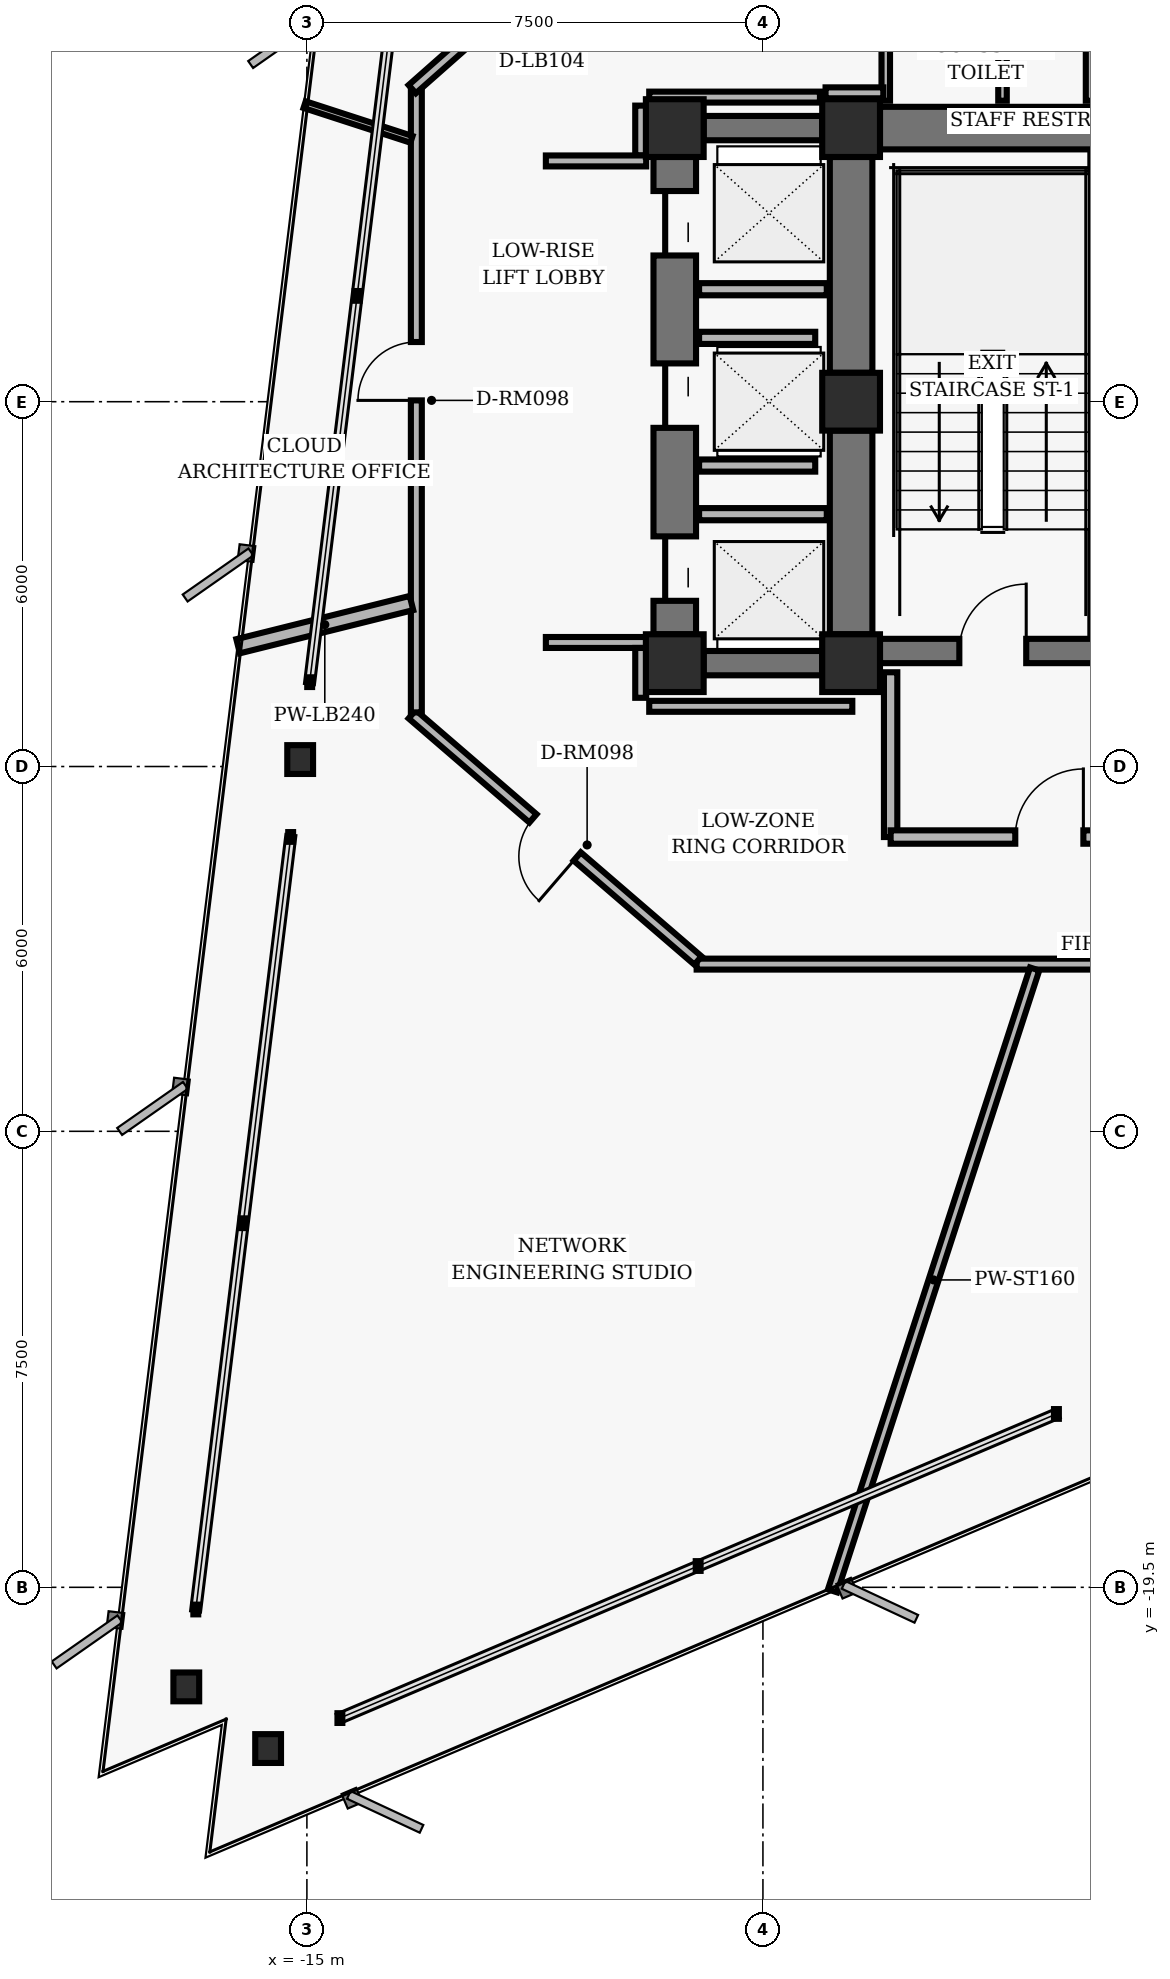
"""IFC4 building model, lengths in metres.
Left out: names, types, materials, properties, quantities, classifications, styles, units other than length and angle.
Written with IfcOpenShell. Run it as: python <this file> out.ifc"""

import sys

from ifc_helpers import new_model, si_unit, direction, frame, frame_2d, origin, origin_2d, place, context, subcontext, project, spatial, rectangle, hollow_rectangle, i_section, extrude, element, fill, save


model = new_model("IFC4")
c1 = context("Model", 3, precision=1e-05, world=origin(), true_north=direction((0.0, 1.0)))
c2 = subcontext(c1, "Body", "Model", "MODEL_VIEW")
j1 = project(units=[si_unit("LENGTHUNIT", "METRE"), si_unit("PLANEANGLEUNIT", "RADIAN")], contexts=[c1])
p1 = place(None, origin())
s1 = spatial("IfcSite", under=j1, at=p1, CompositionType="ELEMENT")
p2 = place(p1, origin())
s2 = spatial("IfcBuilding", under=s1, at=p2, CompositionType="ELEMENT")
p3 = place(p2, frame((0.0, 0.0, 56.32)))
s3 = spatial("IfcBuildingStorey", under=s2, at=p3, CompositionType="ELEMENT", Elevation=56.32)
for number, where, z_axis, x_axis in (
    (1, (-6.05, 4.5, 0.0), (0.0, 0.0, 1.0), (1.0, 0.0, 0.0)),
    (2, (-6.05, 0.0, 0.0), (0.0, 0.0, 1.0), (1.0, 0.0, 0.0)),
    (3, (-6.05, -4.3, 0.0), (0.0, 0.0, 1.0), (1.0, 0.0, 0.0)),
    (4, (-8.95, 4.5, 0.0), (0.0, 0.0, 1.0), (1.0, 0.0, 0.0)),
    (5, (-8.95, -4.3, 0.0), (0.0, 0.0, 1.0), (1.0, 0.0, 0.0)),
):
    element("IfcColumn", number, at=place(p3, frame(where, z_axis=z_axis, x_axis=x_axis)), inside=s3, PredefinedType="COLUMN", context=c2, shape_type="SweptSolid", body=[
        extrude(hollow_rectangle(XDim=0.95, YDim=0.95, WallThickness=0.06, InnerFilletRadius=0.02, OuterFilletRadius=0.04, at=origin_2d()), origin(), (0.0, 0.0, 1.0), 3.36),
    ])
p4 = place(p3, frame((-6.05, 0.475, 0.0), z_axis=(0.0, 0.0, 1.0), x_axis=(0.0, 1.0, 0.0)))
e6 = element("IfcWall", 6, at=p4, inside=s3, PredefinedType="SHEAR", context=c2, shape_type="SweptSolid", body=[
    extrude(rectangle(XDim=3.55, YDim=0.7, at=frame_2d((1.775, 0.0))), origin(), (0.0, 0.0, 1.0), 3.098),
])
p5 = place(p3, frame((-6.05, -3.825, 0.0), z_axis=(0.0, 0.0, 1.0), x_axis=(0.0, 1.0, 0.0)))
e7 = element("IfcWall", 7, at=p5, inside=s3, PredefinedType="SHEAR", context=c2, shape_type="SweptSolid", body=[
    extrude(rectangle(XDim=3.35, YDim=0.7, at=frame_2d((1.675, 0.0))), origin(), (0.0, 0.0, 1.0), 3.098),
])
p6 = place(p3, frame((-5.575, -4.1, 0.0), z_axis=(0.0, 0.0, 1.0), x_axis=(1.0, 0.0, 0.0)))
e8 = element("IfcWall", 8, at=p6, inside=s3, PredefinedType="SHEAR", context=c2, shape_type="SweptSolid", body=[
    extrude(rectangle(XDim=11.15, YDim=0.4, at=frame_2d((5.575, 0.0))), origin(), (0.0, 0.0, 1.0), 3.098),
])
p7 = place(p6, frame((1.305, 0.0, 0.0)))
e9 = element("IfcOpeningElement", 9, at=p7, cuts=e8, PredefinedType="OPENING", context=c2, shape_type="SweptSolid", body=[
    extrude(rectangle(XDim=1.1, YDim=2.04, at=frame_2d((0.55, 1.02))), frame((0.0, 0.21, 0.0), z_axis=(0.0, -1.0, 0.0), x_axis=(1.0, 0.0, 0.0)), (0.0, 0.0, 1.0), 0.42),
])
p8 = place(p6, frame((8.745, 0.0, 0.0)))
e10 = element("IfcOpeningElement", 10, at=p8, cuts=e8, PredefinedType="OPENING", context=c2, shape_type="SweptSolid", body=[
    extrude(rectangle(XDim=1.1, YDim=2.04, at=frame_2d((0.55, 1.02))), frame((0.0, 0.21, 0.0), z_axis=(0.0, -1.0, 0.0), x_axis=(1.0, 0.0, 0.0)), (0.0, 0.0, 1.0), 0.42),
])
p9 = place(p6, frame((4.045, 0.0, 0.0)))
e11 = element("IfcOpeningElement", 11, at=p9, cuts=e8, PredefinedType="OPENING", context=c2, shape_type="SweptSolid", body=[
    extrude(rectangle(XDim=1.06, YDim=2.04, at=frame_2d((0.53, 1.02))), frame((0.0, 0.21, 0.0), z_axis=(0.0, -1.0, 0.0), x_axis=(1.0, 0.0, 0.0)), (0.0, 0.0, 1.0), 0.42),
])
p10 = place(p6, frame((6.045, 0.0, 0.0)))
e12 = element("IfcOpeningElement", 12, at=p10, cuts=e8, PredefinedType="OPENING", context=c2, shape_type="SweptSolid", body=[
    extrude(rectangle(XDim=1.06, YDim=2.04, at=frame_2d((0.53, 1.02))), frame((0.0, 0.21, 0.0), z_axis=(0.0, -1.0, 0.0), x_axis=(1.0, 0.0, 0.0)), (0.0, 0.0, 1.0), 0.42),
])
p11 = place(p3, frame((-5.575, 4.5, 0.0), z_axis=(0.0, 0.0, 1.0), x_axis=(1.0, 0.0, 0.0)))
e13 = element("IfcWall", 13, at=p11, inside=s3, PredefinedType="SHEAR", context=c2, shape_type="SweptSolid", body=[
    extrude(rectangle(XDim=3.525, YDim=0.7, at=frame_2d((1.762, 0.0))), origin(), (0.0, 0.0, 1.0), 3.098),
])
p12 = place(p3, frame((-8.95, -3.825, 0.0), z_axis=(0.0, 0.0, 1.0), x_axis=(0.0, 1.0, 0.0)))
e14 = element("IfcWall", 14, at=p12, inside=s3, PredefinedType="SHEAR", context=c2, shape_type="SweptSolid", body=[
    extrude(rectangle(XDim=7.85, YDim=0.7, at=frame_2d((3.925, 0.0))), origin(), (0.0, 0.0, 1.0), 3.098),
])
p13 = place(p12, frame((0.55, 0.0, 0.0)))
e15 = element("IfcOpeningElement", 15, at=p13, cuts=e14, PredefinedType="OPENING", context=c2, shape_type="SweptSolid", body=[
    extrude(rectangle(XDim=1.06, YDim=2.04, at=frame_2d((0.53, 1.02))), frame((0.0, 0.36, 0.0), z_axis=(0.0, -1.0, 0.0), x_axis=(1.0, 0.0, 0.0)), (0.0, 0.0, 1.0), 0.72),
])
p14 = place(p12, frame((3.395, 0.0, 0.0)))
e16 = element("IfcOpeningElement", 16, at=p14, cuts=e14, PredefinedType="OPENING", context=c2, shape_type="SweptSolid", body=[
    extrude(rectangle(XDim=1.06, YDim=2.04, at=frame_2d((0.53, 1.02))), frame((0.0, 0.36, 0.0), z_axis=(0.0, -1.0, 0.0), x_axis=(1.0, 0.0, 0.0)), (0.0, 0.0, 1.0), 0.72),
])
p15 = place(p12, frame((6.23, 0.0, 0.0)))
e17 = element("IfcOpeningElement", 17, at=p15, cuts=e14, PredefinedType="OPENING", context=c2, shape_type="SweptSolid", body=[
    extrude(rectangle(XDim=1.06, YDim=2.04, at=frame_2d((0.53, 1.02))), frame((0.0, 0.36, 0.0), z_axis=(0.0, -1.0, 0.0), x_axis=(1.0, 0.0, 0.0)), (0.0, 0.0, 1.0), 0.72),
])
for number, where, z_axis, x_axis in (
    (18, (-8.475, 4.5, 0.0), (0.0, 0.0, 1.0), (1.0, 0.0, 0.0)),
    (19, (-8.475, -4.3, 0.0), (0.0, 0.0, 1.0), (1.0, 0.0, 0.0)),
):
    element("IfcWall", number, at=place(p3, frame(where, z_axis=z_axis, x_axis=x_axis)), inside=s3, PredefinedType="SHEAR", context=c2, shape_type="SweptSolid", body=[
        extrude(rectangle(XDim=1.95, YDim=0.4, at=frame_2d((0.975, 0.0))), origin(), (0.0, 0.0, 1.0), 3.098),
    ])
for number, where, z_axis, x_axis in (
    (20, (-15.111, -5.886, 0.0), (0.0, 0.0, 1.0), (1.0, 0.0, 0.0)),
    (21, (-16.983, -21.138, 0.0), (0.0, 0.0, 1.0), (1.0, 0.0, 0.0)),
    (22, (-15.638, -22.152, 0.0), (0.0, 0.0, 1.0), (1.0, 0.0, 0.0)),
):
    element("IfcColumn", number, at=place(p3, frame(where, z_axis=z_axis, x_axis=x_axis)), inside=s3, PredefinedType="COLUMN", context=c2, shape_type="SweptSolid", body=[
        extrude(i_section(OverallWidth=0.424, OverallDepth=0.474, WebThickness=0.048, FlangeThickness=0.077, FilletRadius=0.025, at=origin_2d()), origin(), (0.0, 0.0, 1.0), 3.36),
    ])
p16 = place(p3, frame((-5.4, -7.16, 0.0), z_axis=(0.0, 0.0, 1.0), x_axis=(0.0, 1.0, 0.0)))
e23 = element("IfcWall", 23, at=p16, inside=s3, PredefinedType="PARTITIONING", context=c2, shape_type="SweptSolid", body=[
    extrude(rectangle(XDim=2.71, YDim=0.22, at=frame_2d((1.355, 0.0))), origin(), (0.0, 0.0, 1.0), 3.073),
])
p17 = place(p3, frame((-5.4, -7.16, 0.0), z_axis=(0.0, 0.0, 1.0), x_axis=(1.0, 0.0, 0.0)))
e24 = element("IfcWall", 24, at=p17, inside=s3, PredefinedType="PARTITIONING", context=c2, shape_type="SweptSolid", body=[
    extrude(rectangle(XDim=5.4, YDim=0.22, at=frame_2d((2.7, 0.0))), origin(), (0.0, 0.0, 1.0), 2.587),
])
p18 = place(p17, frame((2.05, 0.0, 0.0)))
e25 = element("IfcOpeningElement", 25, at=p18, cuts=e24, PredefinedType="OPENING", context=c2, shape_type="SweptSolid", body=[
    extrude(rectangle(XDim=1.12, YDim=2.02, at=frame_2d((0.56, 1.01))), frame((0.0, 0.12, 0.0), z_axis=(0.0, -1.0, 0.0), x_axis=(1.0, 0.0, 0.0)), (0.0, 0.0, 1.0), 0.24),
])
for number, where, z_axis, x_axis in (
    (26, (-5.48, 4.95, 0.0), (0.0, 0.0, 1.0), (0.0, 1.0, 0.0)),
    (27, (-3.56, 4.95, 0.0), (0.0, 0.0, 1.0), (0.0, 1.0, 0.0)),
    (28, (-2.12, 4.95, 0.0), (0.0, 0.0, 1.0), (0.0, 1.0, 0.0)),
):
    element("IfcWall", number, at=place(p3, frame(where, z_axis=z_axis, x_axis=x_axis)), inside=s3, PredefinedType="PARTITIONING", context=c2, shape_type="SweptSolid", body=[
        extrude(rectangle(XDim=2.1, YDim=0.14, at=frame_2d((1.05, 0.0))), origin(), (0.0, 0.0, 1.0), 3.073),
    ])
for number, where, z_axis, x_axis in (
    (29, (-8.55, -1.85, 0.0), (0.0, 0.0, 1.0), (1.0, 0.0, 0.0)),
    (30, (-8.55, 1.85, 0.0), (0.0, 0.0, 1.0), (1.0, 0.0, 0.0)),
):
    element("IfcWall", number, at=place(p3, frame(where, z_axis=z_axis, x_axis=x_axis)), inside=s3, PredefinedType="PARTITIONING", context=c2, shape_type="SweptSolid", body=[
        extrude(rectangle(XDim=2.1, YDim=0.2, at=frame_2d((1.05, 0.0))), origin(), (0.0, 0.0, 1.0), 3.073),
    ])
for number, where, z_axis, x_axis in (
    (31, (-8.55, -1.05, 0.0), (0.0, 0.0, 1.0), (1.0, 0.0, 0.0)),
    (32, (-8.55, 1.05, 0.0), (0.0, 0.0, 1.0), (1.0, 0.0, 0.0)),
):
    element("IfcWall", number, at=place(p3, frame(where, z_axis=z_axis, x_axis=x_axis)), inside=s3, PredefinedType="PARTITIONING", context=c2, shape_type="SweptSolid", body=[
        extrude(rectangle(XDim=1.91, YDim=0.2, at=frame_2d((0.955, 0.0))), origin(), (0.0, 0.0, 1.0), 3.073),
    ])
p19 = place(p3, frame((8.41, -9.25, 0.0), z_axis=(0.0, 0.0, 1.0), x_axis=(-1.0, 0.0, 0.0)))
e33 = element("IfcWall", 33, at=p19, inside=s3, PredefinedType="PARTITIONING", context=c2, shape_type="SweptSolid", body=[
    extrude(rectangle(XDim=17.0, YDim=0.18, at=frame_2d((8.5, 0.0))), origin(), (0.0, 0.0, 1.0), 2.587),
])
p20 = place(p19, frame((5.34, 0.0, 0.0)))
e34 = element("IfcOpeningElement", 34, at=p20, cuts=e33, PredefinedType="OPENING", context=c2, shape_type="SweptSolid", body=[
    extrude(rectangle(XDim=1.02, YDim=2.02, at=frame_2d((0.51, 1.01))), frame((0.0, 0.1, 0.0), z_axis=(0.0, -1.0, 0.0), x_axis=(1.0, 0.0, 0.0)), (0.0, 0.0, 1.0), 0.2),
])
p21 = place(p3, frame((-8.568, -9.191, 0.0), z_axis=(0.0, 0.0, 1.0), x_axis=(-0.757556899173, 0.652769135694, 0.0)))
e35 = element("IfcWall", 35, at=p21, inside=s3, PredefinedType="PARTITIONING", context=c2, shape_type="SweptSolid", body=[
    extrude(rectangle(XDim=6.204, YDim=0.18, at=frame_2d((3.102, 0.0))), origin(), (0.0, 0.0, 1.0), 3.073),
])
p22 = place(p21, frame((2.622, 0.0, 0.0)))
e36 = element("IfcOpeningElement", 36, at=p22, cuts=e35, PredefinedType="OPENING", context=c2, shape_type="SweptSolid", body=[
    extrude(rectangle(XDim=0.96, YDim=2.02, at=frame_2d((0.48, 1.01))), frame((0.0, 0.1, 0.0), z_axis=(0.0, -1.0, 0.0), x_axis=(1.0, 0.0, 0.0)), (0.0, 0.0, 1.0), 0.2),
])
p23 = place(p3, frame((-13.2, -5.11, 0.0), z_axis=(0.0, 0.0, 1.0), x_axis=(0.0, 1.0, 0.0)))
e37 = element("IfcWall", 37, at=p23, inside=s3, PredefinedType="PARTITIONING", context=c2, shape_type="SweptSolid", body=[
    extrude(rectangle(XDim=10.22, YDim=0.18, at=frame_2d((5.11, 0.0))), origin(), (0.0, 0.0, 1.0), 2.587),
])
p24 = place(p23, frame((5.132, 0.0, 0.0)))
e38 = element("IfcOpeningElement", 38, at=p24, cuts=e37, PredefinedType="OPENING", context=c2, shape_type="SweptSolid", body=[
    extrude(rectangle(XDim=0.96, YDim=2.02, at=frame_2d((0.48, 1.01))), frame((0.0, 0.1, 0.0), z_axis=(0.0, -1.0, 0.0), x_axis=(1.0, 0.0, 0.0)), (0.0, 0.0, 1.0), 0.2),
])
p25 = place(p3, frame((-13.268, 5.14, 0.0), z_axis=(0.0, 0.0, 1.0), x_axis=(0.749626463267, 0.66186113768, 0.0)))
e39 = element("IfcWall", 39, at=p25, inside=s3, PredefinedType="PARTITIONING", context=c2, shape_type="SweptSolid", body=[
    extrude(rectangle(XDim=6.27, YDim=0.18, at=frame_2d((3.135, 0.0))), origin(), (0.0, 0.0, 1.0), 3.073),
])
p26 = place(p25, frame((2.625, 0.0, 0.0)))
e40 = element("IfcOpeningElement", 40, at=p26, cuts=e39, PredefinedType="OPENING", context=c2, shape_type="SweptSolid", body=[
    extrude(rectangle(XDim=1.02, YDim=2.02, at=frame_2d((0.51, 1.01))), frame((0.0, 0.1, 0.0), z_axis=(0.0, -1.0, 0.0), x_axis=(1.0, 0.0, 0.0)), (0.0, 0.0, 1.0), 0.2),
])
p27 = place(p3, frame((-9.51, 4.87, 0.0), z_axis=(0.0, 0.0, 1.0), x_axis=(0.0, -1.0, 0.0)))
e41 = element("IfcWall", 41, at=p27, inside=s3, PredefinedType="PARTITIONING", context=c2, shape_type="SweptSolid", body=[
    extrude(rectangle(XDim=0.82, YDim=0.18, at=frame_2d((0.41, 0.0))), origin(), (0.0, 0.0, 1.0), 3.073),
])
for number, where, z_axis, x_axis in (
    (42, (-9.42, 3.96, 0.0), (0.0, 0.0, 1.0), (-1.0, 0.0, 0.0)),
    (43, (-11.07, -3.96, 0.0), (0.0, 0.0, 1.0), (1.0, 0.0, 0.0)),
):
    element("IfcWall", number, at=place(p3, frame(where, z_axis=z_axis, x_axis=x_axis)), inside=s3, PredefinedType="PARTITIONING", context=c2, shape_type="SweptSolid", body=[
        extrude(rectangle(XDim=1.65, YDim=0.18, at=frame_2d((0.825, 0.0))), origin(), (0.0, 0.0, 1.0), 3.073),
    ])
p28 = place(p3, frame((-9.51, -4.05, 0.0), z_axis=(0.0, 0.0, 1.0), x_axis=(0.0, -1.0, 0.0)))
e44 = element("IfcWall", 44, at=p28, inside=s3, PredefinedType="PARTITIONING", context=c2, shape_type="SweptSolid", body=[
    extrude(rectangle(XDim=0.82, YDim=0.18, at=frame_2d((0.41, 0.0))), origin(), (0.0, 0.0, 1.0), 3.073),
])
p29 = place(p3, frame((-9.37, -5.01, 0.0), z_axis=(0.0, 0.0, 1.0), x_axis=(1.0, 0.0, 0.0)))
e45 = element("IfcWall", 45, at=p29, inside=s3, PredefinedType="PARTITIONING", context=c2, shape_type="SweptSolid", body=[
    extrude(rectangle(XDim=3.34, YDim=0.18, at=frame_2d((1.67, 0.0))), origin(), (0.0, 0.0, 1.0), 3.073),
])
p30 = place(p3, frame((-5.52, 5.08, 0.0), z_axis=(0.0, 0.0, 1.0), x_axis=(-1.0, 0.0, 0.0)))
e46 = element("IfcWall", 46, at=p30, inside=s3, PredefinedType="PARTITIONING", context=c2, shape_type="SweptSolid", body=[
    extrude(rectangle(XDim=0.95, YDim=0.18, at=frame_2d((0.475, 0.0))), origin(), (0.0, 0.0, 1.0), 3.073),
])
p31 = place(p3, frame((-6.562, 5.01, 0.0), z_axis=(0.0, 0.0, 1.0), x_axis=(-1.0, 0.0, 0.0)))
e47 = element("IfcWall", 47, at=p31, inside=s3, PredefinedType="PARTITIONING", context=c2, shape_type="SweptSolid", body=[
    extrude(rectangle(XDim=2.808, YDim=0.18, at=frame_2d((1.404, 0.0))), origin(), (0.0, 0.0, 1.0), 3.073),
])
p32 = place(p3, frame((-13.28, -3.311, 0.0), z_axis=(0.0, 0.0, 1.0), x_axis=(-0.970288946824, -0.241949084873, 0.0)))
e48 = element("IfcWall", 48, at=p32, inside=s3, PredefinedType="PARTITIONING", context=c2, shape_type="SweptSolid", body=[
    extrude(rectangle(XDim=2.938, YDim=0.24, at=frame_2d((1.469, 0.0))), origin(), (0.0, 0.0, 1.0), 3.073),
])
p33 = place(p3, frame((-3.031, -9.33, 0.0), z_axis=(0.0, 0.0, 1.0), x_axis=(-0.309020370084, -0.951055419454, 0.0)))
e49 = element("IfcWall", 49, at=p33, inside=s3, PredefinedType="PARTITIONING", context=c2, shape_type="SweptSolid", body=[
    extrude(rectangle(XDim=10.755, YDim=0.16, at=frame_2d((5.377, 0.0))), origin(), (0.0, 0.0, 1.0), 3.073),
])
p34 = place(p3, frame((-13.28, 4.315, 0.0), z_axis=(0.0, 0.0, 1.0), x_axis=(-0.951047661396, 0.309044245624, 0.0)))
e50 = element("IfcWall", 50, at=p34, inside=s3, PredefinedType="MOVABLE", context=c2, shape_type="SweptSolid", body=[
    extrude(rectangle(XDim=1.848, YDim=0.115, at=frame_2d((0.924, 0.0))), origin(), (0.0, 0.0, 1.0), 3.073),
])
p35 = place(p7, origin())
e51 = element("IfcDoor", 51, at=p35, inside=s3, OperationType="SINGLE_SWING_RIGHT", PredefinedType="DOOR", context=c2, shape_type="SweptSolid", body=[
    extrude(rectangle(XDim=1.1, YDim=2.04, at=frame_2d((0.55, 1.02))), frame((0.0, 0.025, 0.0), z_axis=(0.0, -1.0, 0.0), x_axis=(1.0, 0.0, 0.0)), (0.0, 0.0, 1.0), 0.05),
])
fill(e9, e51)
p36 = place(p18, origin())
e52 = element("IfcDoor", 52, at=p36, inside=s3, OperationType="SINGLE_SWING_RIGHT", PredefinedType="DOOR", context=c2, shape_type="SweptSolid", body=[
    extrude(rectangle(XDim=1.12, YDim=2.02, at=frame_2d((0.56, 1.01))), frame((0.0, 0.025, 0.0), z_axis=(0.0, -1.0, 0.0), x_axis=(1.0, 0.0, 0.0)), (0.0, 0.0, 1.0), 0.05),
])
fill(e25, e52)
p37 = place(p13, origin())
e53 = element("IfcDoor", 53, at=p37, inside=s3, OperationType="SLIDING_TO_LEFT", PredefinedType="DOOR", context=c2, shape_type="SweptSolid", body=[
    extrude(rectangle(XDim=1.06, YDim=2.04, at=frame_2d((0.53, 1.02))), frame((0.0, 0.025, 0.0), z_axis=(0.0, -1.0, 0.0), x_axis=(1.0, 0.0, 0.0)), (0.0, 0.0, 1.0), 0.05),
])
fill(e15, e53)
p38 = place(p14, origin())
e54 = element("IfcDoor", 54, at=p38, inside=s3, OperationType="SLIDING_TO_RIGHT", PredefinedType="DOOR", context=c2, shape_type="SweptSolid", body=[
    extrude(rectangle(XDim=1.06, YDim=2.04, at=frame_2d((0.53, 1.02))), frame((0.0, 0.025, 0.0), z_axis=(0.0, -1.0, 0.0), x_axis=(1.0, 0.0, 0.0)), (0.0, 0.0, 1.0), 0.05),
])
fill(e16, e54)
p39 = place(p15, origin())
e55 = element("IfcDoor", 55, at=p39, inside=s3, OperationType="SLIDING_TO_LEFT", PredefinedType="DOOR", context=c2, shape_type="SweptSolid", body=[
    extrude(rectangle(XDim=1.06, YDim=2.04, at=frame_2d((0.53, 1.02))), frame((0.0, 0.025, 0.0), z_axis=(0.0, -1.0, 0.0), x_axis=(1.0, 0.0, 0.0)), (0.0, 0.0, 1.0), 0.05),
])
fill(e17, e55)
p40 = place(p22, origin())
e56 = element("IfcDoor", 56, at=p40, inside=s3, OperationType="SINGLE_SWING_LEFT", PredefinedType="DOOR", context=c2, shape_type="SweptSolid", body=[
    extrude(rectangle(XDim=0.96, YDim=2.02, at=frame_2d((0.48, 1.01))), frame((0.0, 0.025, 0.0), z_axis=(0.0, -1.0, 0.0), x_axis=(1.0, 0.0, 0.0)), (0.0, 0.0, 1.0), 0.05),
])
fill(e36, e56)
p41 = place(p24, origin())
e57 = element("IfcDoor", 57, at=p41, inside=s3, OperationType="SINGLE_SWING_LEFT", PredefinedType="DOOR", context=c2, shape_type="SweptSolid", body=[
    extrude(rectangle(XDim=0.96, YDim=2.02, at=frame_2d((0.48, 1.01))), frame((0.0, 0.025, 0.0), z_axis=(0.0, -1.0, 0.0), x_axis=(1.0, 0.0, 0.0)), (0.0, 0.0, 1.0), 0.05),
])
fill(e38, e57)
save(model, sys.argv[1])
